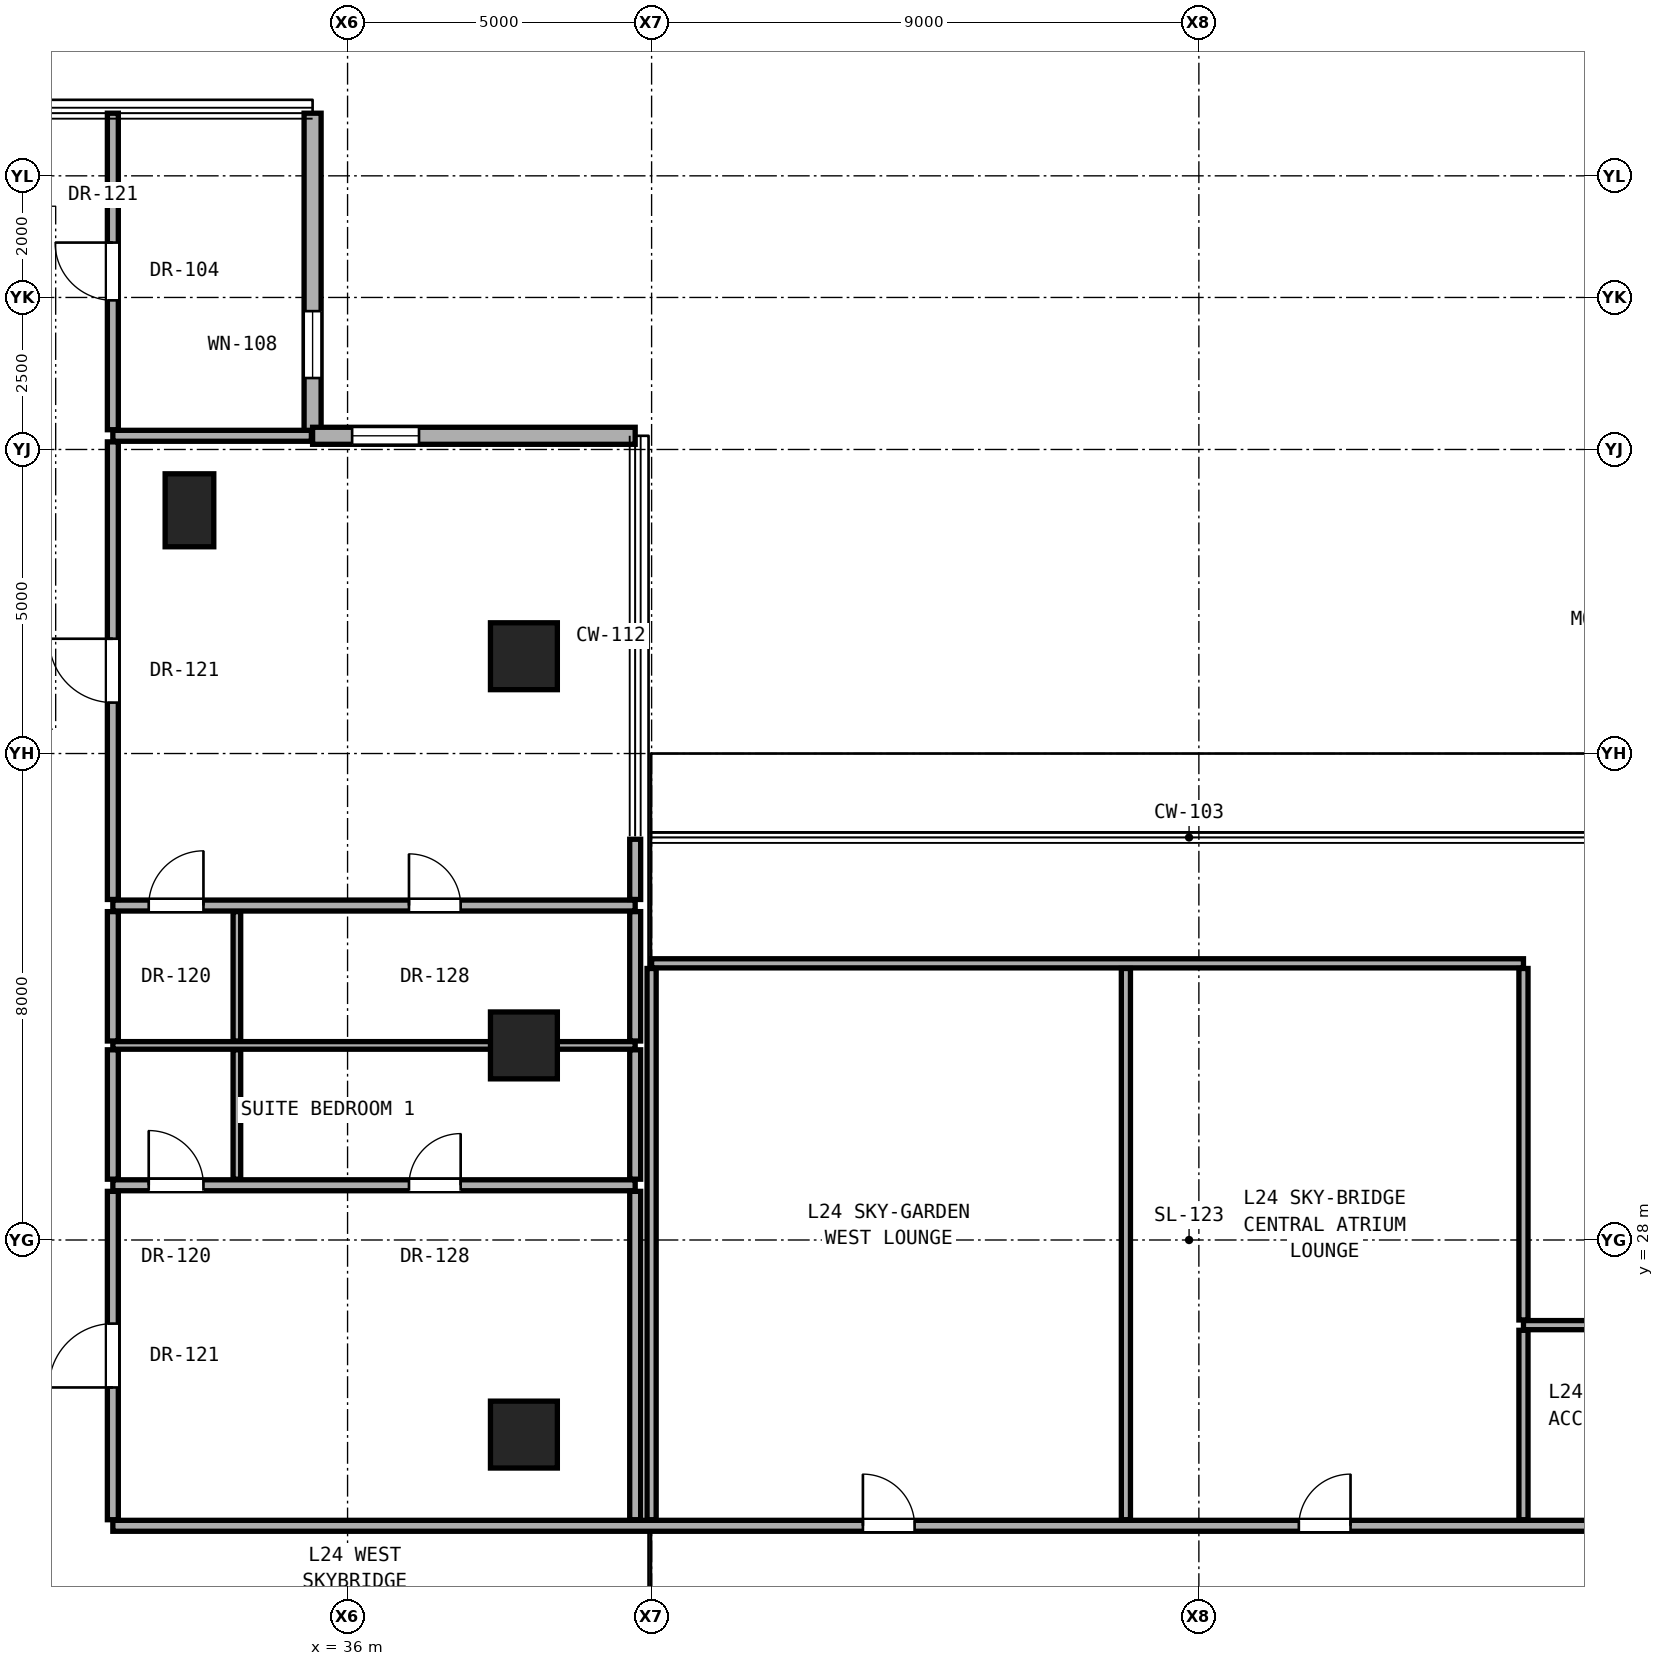
"""IFC4 building model, lengths in metres.
Left out: names, types, materials, properties, quantities, classifications, styles, units other than length and angle.
Written with IfcOpenShell. Run it as: python <this file> out.ifc"""

import sys

from ifc_helpers import new_model, si_unit, direction, frame, frame_2d, origin, origin_2d, place, context, subcontext, project, spatial, rectangle, hollow_rectangle, extrude, element, fill, save


model = new_model("IFC4")
c1 = context("Model", 3, precision=1e-05, world=origin(), true_north=direction((0.0, 1.0)))
c2 = subcontext(c1, "Body", "Model", "MODEL_VIEW")
j1 = project(units=[si_unit("LENGTHUNIT", "METRE"), si_unit("PLANEANGLEUNIT", "RADIAN")], contexts=[c1])
p1 = place(None, origin())
s1 = spatial("IfcSite", under=j1, at=p1, CompositionType="ELEMENT")
p2 = place(p1, origin())
s2 = spatial("IfcBuilding", under=s1, at=p2, CompositionType="ELEMENT")
p3 = place(p2, frame((0.0, 0.0, 88.4)))
s3 = spatial("IfcBuildingStorey", under=s2, at=p3, CompositionType="ELEMENT", Elevation=88.4)
for number, where, z_axis, x_axis in (
    (1, (38.9, 24.8, 0.0), (0.0, 0.0, 1.0), (1.0, 0.0, 0.0)),
    (2, (38.9, 31.2, 0.0), (0.0, 0.0, 1.0), (1.0, 0.0, 0.0)),
    (3, (38.9, 37.6, 0.0), (0.0, 0.0, 1.0), (1.0, 0.0, 0.0)),
):
    element("IfcColumn", number, at=place(p3, frame(where, z_axis=z_axis, x_axis=x_axis)), inside=s3, PredefinedType="COLUMN", context=c2, shape_type="SweptSolid", body=[
        extrude(hollow_rectangle(XDim=1.1, YDim=1.1, WallThickness=0.06, at=origin_2d()), origin(), (0.0, 0.0, 1.0), 3.3),
    ])
p4 = place(p3, frame((33.4, 40.0, 0.0), z_axis=(0.0, 0.0, 1.0), x_axis=(1.0, 0.0, 0.0)))
e4 = element("IfcColumn", 4, at=p4, inside=s3, PredefinedType="PILASTER", context=c2, shape_type="SweptSolid", body=[
    extrude(rectangle(XDim=0.8, YDim=1.2, at=origin_2d()), origin(), (0.0, 0.0, 1.0), 3.3),
])
p5 = place(p3, frame((35.425, 41.225, 0.0), z_axis=(0.0, 0.0, 1.0), x_axis=(0.0, 1.0, 0.0)))
e5 = element("IfcWall", 5, at=p5, inside=s3, PredefinedType="SOLIDWALL", context=c2, shape_type="SweptSolid", body=[
    extrude(rectangle(XDim=5.305, YDim=0.28, at=frame_2d((2.652, 0.0))), origin(), (0.0, 0.0, 1.0), 3.06),
])
p6 = place(p5, frame((0.95, 0.0, 0.85)))
e6 = element("IfcOpeningElement", 6, at=p6, cuts=e5, PredefinedType="OPENING", context=c2, shape_type="SweptSolid", body=[
    extrude(rectangle(XDim=1.1, YDim=2.0, at=frame_2d((0.55, 1.0))), frame((0.0, 0.15, 0.0), z_axis=(0.0, -1.0, 0.0), x_axis=(1.0, 0.0, 0.0)), (0.0, 0.0, 1.0), 0.3),
])
p7 = place(p3, frame((40.73, 41.225, 0.0), z_axis=(0.0, 0.0, 1.0), x_axis=(-1.0, 0.0, 0.0)))
e7 = element("IfcWall", 7, at=p7, inside=s3, PredefinedType="SOLIDWALL", context=c2, shape_type="SweptSolid", body=[
    extrude(rectangle(XDim=5.305, YDim=0.28, at=frame_2d((2.652, 0.0))), origin(), (0.0, 0.0, 1.0), 3.06),
])
p8 = place(p7, frame((3.555, 0.0, 0.85)))
e8 = element("IfcOpeningElement", 8, at=p8, cuts=e7, PredefinedType="OPENING", context=c2, shape_type="SweptSolid", body=[
    extrude(rectangle(XDim=1.1, YDim=2.0, at=frame_2d((0.55, 1.0))), frame((0.0, 0.15, 0.0), z_axis=(0.0, -1.0, 0.0), x_axis=(1.0, 0.0, 0.0)), (0.0, 0.0, 1.0), 0.3),
])
p9 = place(p3, frame((32.14, 23.3, 0.0), z_axis=(0.0, 0.0, 1.0), x_axis=(1.0, 0.0, 0.0)))
e9 = element("IfcWall", 9, at=p9, inside=s3, PredefinedType="PARTITIONING", context=c2, shape_type="SweptSolid", body=[
    extrude(rectangle(XDim=33.11, YDim=0.18, at=frame_2d((16.555, 0.0))), origin(), (0.0, 0.0, 1.0), 2.145),
])
p10 = place(p9, frame((12.335, 0.0, 0.0)))
e10 = element("IfcOpeningElement", 10, at=p10, cuts=e9, PredefinedType="OPENING", context=c2, shape_type="SweptSolid", body=[
    extrude(rectangle(XDim=0.85, YDim=2.01, at=frame_2d((0.425, 1.005))), frame((0.0, 0.1, 0.0), z_axis=(0.0, -1.0, 0.0), x_axis=(1.0, 0.0, 0.0)), (0.0, 0.0, 1.0), 0.2),
])
p11 = place(p9, frame((19.504, 0.0, 0.0)))
e11 = element("IfcOpeningElement", 11, at=p11, cuts=e9, PredefinedType="OPENING", context=c2, shape_type="SweptSolid", body=[
    extrude(rectangle(XDim=0.85, YDim=2.01, at=frame_2d((0.425, 1.005))), frame((0.0, 0.1, 0.0), z_axis=(0.0, -1.0, 0.0), x_axis=(1.0, 0.0, 0.0)), (0.0, 0.0, 1.0), 0.2),
])
p12 = place(p9, frame((24.398, 0.0, 0.0)))
e12 = element("IfcOpeningElement", 12, at=p12, cuts=e9, PredefinedType="OPENING", context=c2, shape_type="SweptSolid", body=[
    extrude(rectangle(XDim=0.9, YDim=2.1, at=frame_2d((0.45, 1.05))), frame((0.0, 0.1, 0.0), z_axis=(0.0, -1.0, 0.0), x_axis=(1.0, 0.0, 0.0)), (0.0, 0.0, 1.0), 0.2),
])
p13 = place(p3, frame((55.338, 26.6, 0.0), z_axis=(0.0, 0.0, 1.0), x_axis=(1.0, 0.0, 0.0)))
e13 = element("IfcWall", 13, at=p13, inside=s3, PredefinedType="PARTITIONING", context=c2, shape_type="SweptSolid", body=[
    extrude(rectangle(XDim=3.3, YDim=0.15, at=frame_2d((1.65, 0.0))), origin(), (0.0, 0.0, 1.0), 2.085),
])
p14 = place(p3, frame((32.14, 28.9, 0.0), z_axis=(0.0, 0.0, 1.0), x_axis=(1.0, 0.0, 0.0)))
e14 = element("IfcWall", 14, at=p14, inside=s3, PredefinedType="PARTITIONING", context=c2, shape_type="SweptSolid", body=[
    extrude(rectangle(XDim=8.59, YDim=0.18, at=frame_2d((4.295, 0.0))), origin(), (0.0, 0.0, 1.0), 2.145),
])
p15 = place(p14, frame((4.87, 0.0, 0.0)))
e15 = element("IfcOpeningElement", 15, at=p15, cuts=e14, PredefinedType="OPENING", context=c2, shape_type="SweptSolid", body=[
    extrude(rectangle(XDim=0.85, YDim=2.01, at=frame_2d((0.425, 1.005))), frame((0.0, 0.1, 0.0), z_axis=(0.0, -1.0, 0.0), x_axis=(1.0, 0.0, 0.0)), (0.0, 0.0, 1.0), 0.2),
])
p16 = place(p14, frame((0.59, 0.0, 0.0)))
e16 = element("IfcOpeningElement", 16, at=p16, cuts=e14, PredefinedType="OPENING", context=c2, shape_type="SweptSolid", body=[
    extrude(rectangle(XDim=0.9, YDim=2.1, at=frame_2d((0.45, 1.05))), frame((0.0, 0.1, 0.0), z_axis=(0.0, -1.0, 0.0), x_axis=(1.0, 0.0, 0.0)), (0.0, 0.0, 1.0), 0.2),
])
p17 = place(p3, frame((32.14, 31.2, 0.0), z_axis=(0.0, 0.0, 1.0), x_axis=(1.0, 0.0, 0.0)))
e17 = element("IfcWall", 17, at=p17, inside=s3, PredefinedType="PARTITIONING", context=c2, shape_type="SweptSolid", body=[
    extrude(rectangle(XDim=8.59, YDim=0.125, at=frame_2d((4.295, 0.0))), origin(), (0.0, 0.0, 1.0), 2.145),
])
p18 = place(p3, frame((41.0, 32.55, 0.0), z_axis=(0.0, 0.0, 1.0), x_axis=(1.0, 0.0, 0.0)))
e18 = element("IfcWall", 18, at=p18, inside=s3, PredefinedType="PARTITIONING", context=c2, shape_type="SweptSolid", body=[
    extrude(rectangle(XDim=14.338, YDim=0.15, at=frame_2d((7.169, 0.0))), origin(), (0.0, 0.0, 1.0), 2.316),
])
p19 = place(p3, frame((32.14, 33.5, 0.0), z_axis=(0.0, 0.0, 1.0), x_axis=(1.0, 0.0, 0.0)))
e19 = element("IfcWall", 19, at=p19, inside=s3, PredefinedType="PARTITIONING", context=c2, shape_type="SweptSolid", body=[
    extrude(rectangle(XDim=8.59, YDim=0.18, at=frame_2d((4.295, 0.0))), origin(), (0.0, 0.0, 1.0), 2.145),
])
p20 = place(p19, frame((4.87, 0.0, 0.0)))
e20 = element("IfcOpeningElement", 20, at=p20, cuts=e19, PredefinedType="OPENING", context=c2, shape_type="SweptSolid", body=[
    extrude(rectangle(XDim=0.85, YDim=2.01, at=frame_2d((0.425, 1.005))), frame((0.0, 0.1, 0.0), z_axis=(0.0, -1.0, 0.0), x_axis=(1.0, 0.0, 0.0)), (0.0, 0.0, 1.0), 0.2),
])
p21 = place(p19, frame((0.59, 0.0, 0.0)))
e21 = element("IfcOpeningElement", 21, at=p21, cuts=e19, PredefinedType="OPENING", context=c2, shape_type="SweptSolid", body=[
    extrude(rectangle(XDim=0.9, YDim=2.1, at=frame_2d((0.45, 1.05))), frame((0.0, 0.1, 0.0), z_axis=(0.0, -1.0, 0.0), x_axis=(1.0, 0.0, 0.0)), (0.0, 0.0, 1.0), 0.2),
])
p22 = place(p3, frame((32.14, 41.225, 0.0), z_axis=(0.0, 0.0, 1.0), x_axis=(1.0, 0.0, 0.0)))
e22 = element("IfcWall", 22, at=p22, inside=s3, PredefinedType="PARTITIONING", context=c2, shape_type="SweptSolid", body=[
    extrude(rectangle(XDim=3.265, YDim=0.18, at=frame_2d((1.633, 0.0))), origin(), (0.0, 0.0, 1.0), 3.08),
])
p23 = place(p3, frame((32.14, 23.4, 0.0), z_axis=(0.0, 0.0, 1.0), x_axis=(0.0, 1.0, 0.0)))
e23 = element("IfcWall", 23, at=p23, inside=s3, PredefinedType="PARTITIONING", context=c2, shape_type="SweptSolid", body=[
    extrude(rectangle(XDim=5.4, YDim=0.18, at=frame_2d((2.7, 0.0))), origin(), (0.0, 0.0, 1.0), 2.299),
])
p24 = place(p23, frame((2.175, 0.0, 0.0)))
e24 = element("IfcOpeningElement", 24, at=p24, cuts=e23, PredefinedType="OPENING", context=c2, shape_type="SweptSolid", body=[
    extrude(rectangle(XDim=1.05, YDim=2.2, at=frame_2d((0.525, 1.1))), frame((0.0, 0.1, 0.0), z_axis=(0.0, -1.0, 0.0), x_axis=(1.0, 0.0, 0.0)), (0.0, 0.0, 1.0), 0.2),
])
for number, where, z_axis, x_axis in (
    (25, (32.14, 29.0, 0.0), (0.0, 0.0, 1.0), (0.0, 1.0, 0.0)),
    (26, (32.14, 31.272, 0.0), (0.0, 0.0, 1.0), (0.0, 1.0, 0.0)),
):
    element("IfcWall", number, at=place(p3, frame(where, z_axis=z_axis, x_axis=x_axis)), inside=s3, PredefinedType="PARTITIONING", context=c2, shape_type="SweptSolid", body=[
        extrude(rectangle(XDim=2.127, YDim=0.18, at=frame_2d((1.064, 0.0))), origin(), (0.0, 0.0, 1.0), 2.299),
    ])
p25 = place(p3, frame((32.14, 33.6, 0.0), z_axis=(0.0, 0.0, 1.0), x_axis=(0.0, 1.0, 0.0)))
e27 = element("IfcWall", 27, at=p25, inside=s3, PredefinedType="PARTITIONING", context=c2, shape_type="SweptSolid", body=[
    extrude(rectangle(XDim=7.525, YDim=0.18, at=frame_2d((3.762, 0.0))), origin(), (0.0, 0.0, 1.0), 2.456),
])
p26 = place(p25, frame((3.238, 0.0, 0.0)))
e28 = element("IfcOpeningElement", 28, at=p26, cuts=e27, PredefinedType="OPENING", context=c2, shape_type="SweptSolid", body=[
    extrude(rectangle(XDim=1.05, YDim=2.2, at=frame_2d((0.525, 1.1))), frame((0.0, 0.1, 0.0), z_axis=(0.0, -1.0, 0.0), x_axis=(1.0, 0.0, 0.0)), (0.0, 0.0, 1.0), 0.2),
])
p27 = place(p3, frame((32.14, 41.325, 0.0), z_axis=(0.0, 0.0, 1.0), x_axis=(0.0, 1.0, 0.0)))
e29 = element("IfcWall", 29, at=p27, inside=s3, PredefinedType="PARTITIONING", context=c2, shape_type="SweptSolid", body=[
    extrude(rectangle(XDim=5.205, YDim=0.18, at=frame_2d((2.603, 0.0))), origin(), (0.0, 0.0, 1.0), 3.08),
])
p28 = place(p27, frame((2.127, 0.0, 0.0)))
e30 = element("IfcOpeningElement", 30, at=p28, cuts=e29, PredefinedType="OPENING", context=c2, shape_type="SweptSolid", body=[
    extrude(rectangle(XDim=0.95, YDim=2.15, at=frame_2d((0.475, 1.075))), frame((0.0, 0.1, 0.0), z_axis=(0.0, -1.0, 0.0), x_axis=(1.0, 0.0, 0.0)), (0.0, 0.0, 1.0), 0.2),
])
for number, where, z_axis, x_axis in (
    (31, (34.18, 29.0, 0.0), (0.0, 0.0, 1.0), (0.0, 1.0, 0.0)),
    (32, (34.18, 31.272, 0.0), (0.0, 0.0, 1.0), (0.0, 1.0, 0.0)),
):
    element("IfcWall", number, at=place(p3, frame(where, z_axis=z_axis, x_axis=x_axis)), inside=s3, PredefinedType="PARTITIONING", context=c2, shape_type="SweptSolid", body=[
        extrude(rectangle(XDim=2.127, YDim=0.125, at=frame_2d((1.064, 0.0))), origin(), (0.0, 0.0, 1.0), 2.299),
    ])
p29 = place(p3, frame((40.73, 23.4, 0.0), z_axis=(0.0, 0.0, 1.0), x_axis=(0.0, 1.0, 0.0)))
e33 = element("IfcWall", 33, at=p29, inside=s3, PredefinedType="PARTITIONING", context=c2, shape_type="SweptSolid", body=[
    extrude(rectangle(XDim=5.4, YDim=0.18, at=frame_2d((2.7, 0.0))), origin(), (0.0, 0.0, 1.0), 2.085),
])
p30 = place(p3, frame((40.73, 29.0, 0.0), z_axis=(0.0, 0.0, 1.0), x_axis=(0.0, 1.0, 0.0)))
e34 = element("IfcWall", 34, at=p30, inside=s3, PredefinedType="PARTITIONING", context=c2, shape_type="SweptSolid", body=[
    extrude(rectangle(XDim=2.127, YDim=0.18, at=frame_2d((1.064, 0.0))), origin(), (0.0, 0.0, 1.0), 3.08),
])
p31 = place(p3, frame((40.73, 31.272, 0.0), z_axis=(0.0, 0.0, 1.0), x_axis=(0.0, 1.0, 0.0)))
e35 = element("IfcWall", 35, at=p31, inside=s3, PredefinedType="PARTITIONING", context=c2, shape_type="SweptSolid", body=[
    extrude(rectangle(XDim=2.127, YDim=0.18, at=frame_2d((1.064, 0.0))), origin(), (0.0, 0.0, 1.0), 2.085),
])
p32 = place(p3, frame((40.73, 33.6, 0.0), z_axis=(0.0, 0.0, 1.0), x_axis=(0.0, 1.0, 0.0)))
e36 = element("IfcWall", 36, at=p32, inside=s3, PredefinedType="PARTITIONING", context=c2, shape_type="SweptSolid", body=[
    extrude(rectangle(XDim=0.99, YDim=0.18, at=frame_2d((0.495, 0.0))), origin(), (0.0, 0.0, 1.0), 2.085),
])
for number, where, z_axis, x_axis in (
    (37, (41.0, 23.4, 0.0), (0.0, 0.0, 1.0), (0.0, 1.0, 0.0)),
    (38, (48.8, 23.4, 0.0), (0.0, 0.0, 1.0), (0.0, 1.0, 0.0)),
):
    element("IfcWall", number, at=place(p3, frame(where, z_axis=z_axis, x_axis=x_axis)), inside=s3, PredefinedType="PARTITIONING", context=c2, shape_type="SweptSolid", body=[
        extrude(rectangle(XDim=9.065, YDim=0.15, at=frame_2d((4.533, 0.0))), origin(), (0.0, 0.0, 1.0), 2.085),
    ])
p33 = place(p3, frame((55.338, 23.4, 0.0), z_axis=(0.0, 0.0, 1.0), x_axis=(0.0, 1.0, 0.0)))
e39 = element("IfcWall", 39, at=p33, inside=s3, PredefinedType="PARTITIONING", context=c2, shape_type="SweptSolid", body=[
    extrude(rectangle(XDim=3.115, YDim=0.15, at=frame_2d((1.558, 0.0))), origin(), (0.0, 0.0, 1.0), 3.02),
])
p34 = place(p3, frame((55.338, 26.685, 0.0), z_axis=(0.0, 0.0, 1.0), x_axis=(0.0, 1.0, 0.0)))
e40 = element("IfcWall", 40, at=p34, inside=s3, PredefinedType="PARTITIONING", context=c2, shape_type="SweptSolid", body=[
    extrude(rectangle(XDim=5.78, YDim=0.15, at=frame_2d((2.89, 0.0))), origin(), (0.0, 0.0, 1.0), 2.085),
])
p35 = place(p6, origin())
e41 = element("IfcWindow", 41, at=p35, inside=s3, PartitioningType="SINGLE_PANEL", PredefinedType="WINDOW", context=c2, shape_type="SweptSolid", body=[
    extrude(rectangle(XDim=1.1, YDim=2.0, at=frame_2d((0.55, 1.0))), frame((0.0, 0.03, 0.0), z_axis=(0.0, -1.0, 0.0), x_axis=(1.0, 0.0, 0.0)), (0.0, 0.0, 1.0), 0.06),
])
fill(e6, e41)
p36 = place(p8, origin())
e42 = element("IfcWindow", 42, at=p36, inside=s3, PartitioningType="SINGLE_PANEL", PredefinedType="WINDOW", context=c2, shape_type="SweptSolid", body=[
    extrude(rectangle(XDim=1.1, YDim=2.0, at=frame_2d((0.55, 1.0))), frame((0.0, 0.03, 0.0), z_axis=(0.0, -1.0, 0.0), x_axis=(1.0, 0.0, 0.0)), (0.0, 0.0, 1.0), 0.06),
])
fill(e8, e42)
p37 = place(p24, origin())
e43 = element("IfcDoor", 43, at=p37, inside=s3, OperationType="SINGLE_SWING_LEFT", PredefinedType="DOOR", context=c2, shape_type="SweptSolid", body=[
    extrude(rectangle(XDim=1.05, YDim=2.2, at=frame_2d((0.525, 1.1))), frame((0.0, 0.025, 0.0), z_axis=(0.0, -1.0, 0.0), x_axis=(1.0, 0.0, 0.0)), (0.0, 0.0, 1.0), 0.05),
])
fill(e24, e43)
p38 = place(p15, origin())
e44 = element("IfcDoor", 44, at=p38, inside=s3, OperationType="SINGLE_SWING_RIGHT", PredefinedType="DOOR", context=c2, shape_type="SweptSolid", body=[
    extrude(rectangle(XDim=0.85, YDim=2.01, at=frame_2d((0.425, 1.005))), frame((0.0, 0.025, 0.0), z_axis=(0.0, -1.0, 0.0), x_axis=(1.0, 0.0, 0.0)), (0.0, 0.0, 1.0), 0.05),
])
fill(e15, e44)
p39 = place(p16, origin())
e45 = element("IfcDoor", 45, at=p39, inside=s3, OperationType="SINGLE_SWING_LEFT", PredefinedType="DOOR", context=c2, shape_type="SweptSolid", body=[
    extrude(rectangle(XDim=0.9, YDim=2.1, at=frame_2d((0.45, 1.05))), frame((0.0, 0.025, 0.0), z_axis=(0.0, -1.0, 0.0), x_axis=(1.0, 0.0, 0.0)), (0.0, 0.0, 1.0), 0.05),
])
fill(e16, e45)
p40 = place(p26, origin())
e46 = element("IfcDoor", 46, at=p40, inside=s3, OperationType="SINGLE_SWING_RIGHT", PredefinedType="DOOR", context=c2, shape_type="SweptSolid", body=[
    extrude(rectangle(XDim=1.05, YDim=2.2, at=frame_2d((0.525, 1.1))), frame((0.0, 0.025, 0.0), z_axis=(0.0, -1.0, 0.0), x_axis=(1.0, 0.0, 0.0)), (0.0, 0.0, 1.0), 0.05),
])
fill(e28, e46)
p41 = place(p20, origin())
e47 = element("IfcDoor", 47, at=p41, inside=s3, OperationType="SINGLE_SWING_LEFT", PredefinedType="DOOR", context=c2, shape_type="SweptSolid", body=[
    extrude(rectangle(XDim=0.85, YDim=2.01, at=frame_2d((0.425, 1.005))), frame((0.0, 0.025, 0.0), z_axis=(0.0, -1.0, 0.0), x_axis=(1.0, 0.0, 0.0)), (0.0, 0.0, 1.0), 0.05),
])
fill(e20, e47)
p42 = place(p21, origin())
e48 = element("IfcDoor", 48, at=p42, inside=s3, OperationType="SINGLE_SWING_RIGHT", PredefinedType="DOOR", context=c2, shape_type="SweptSolid", body=[
    extrude(rectangle(XDim=0.9, YDim=2.1, at=frame_2d((0.45, 1.05))), frame((0.0, 0.025, 0.0), z_axis=(0.0, -1.0, 0.0), x_axis=(1.0, 0.0, 0.0)), (0.0, 0.0, 1.0), 0.05),
])
fill(e21, e48)
p43 = place(p28, origin())
e49 = element("IfcDoor", 49, at=p43, inside=s3, OperationType="SINGLE_SWING_RIGHT", PredefinedType="DOOR", context=c2, shape_type="SweptSolid", body=[
    extrude(rectangle(XDim=0.95, YDim=2.15, at=frame_2d((0.475, 1.075))), frame((0.0, 0.025, 0.0), z_axis=(0.0, -1.0, 0.0), x_axis=(1.0, 0.0, 0.0)), (0.0, 0.0, 1.0), 0.05),
])
fill(e30, e49)
p44 = place(p10, origin())
e50 = element("IfcDoor", 50, at=p44, inside=s3, OperationType="SINGLE_SWING_LEFT", PredefinedType="DOOR", context=c2, shape_type="SweptSolid", body=[
    extrude(rectangle(XDim=0.85, YDim=2.01, at=frame_2d((0.425, 1.005))), frame((0.0, 0.025, 0.0), z_axis=(0.0, -1.0, 0.0), x_axis=(1.0, 0.0, 0.0)), (0.0, 0.0, 1.0), 0.05),
])
fill(e10, e50)
p45 = place(p11, origin())
e51 = element("IfcDoor", 51, at=p45, inside=s3, OperationType="SINGLE_SWING_RIGHT", PredefinedType="DOOR", context=c2, shape_type="SweptSolid", body=[
    extrude(rectangle(XDim=0.85, YDim=2.01, at=frame_2d((0.425, 1.005))), frame((0.0, 0.025, 0.0), z_axis=(0.0, -1.0, 0.0), x_axis=(1.0, 0.0, 0.0)), (0.0, 0.0, 1.0), 0.05),
])
fill(e11, e51)
save(model, sys.argv[1])
